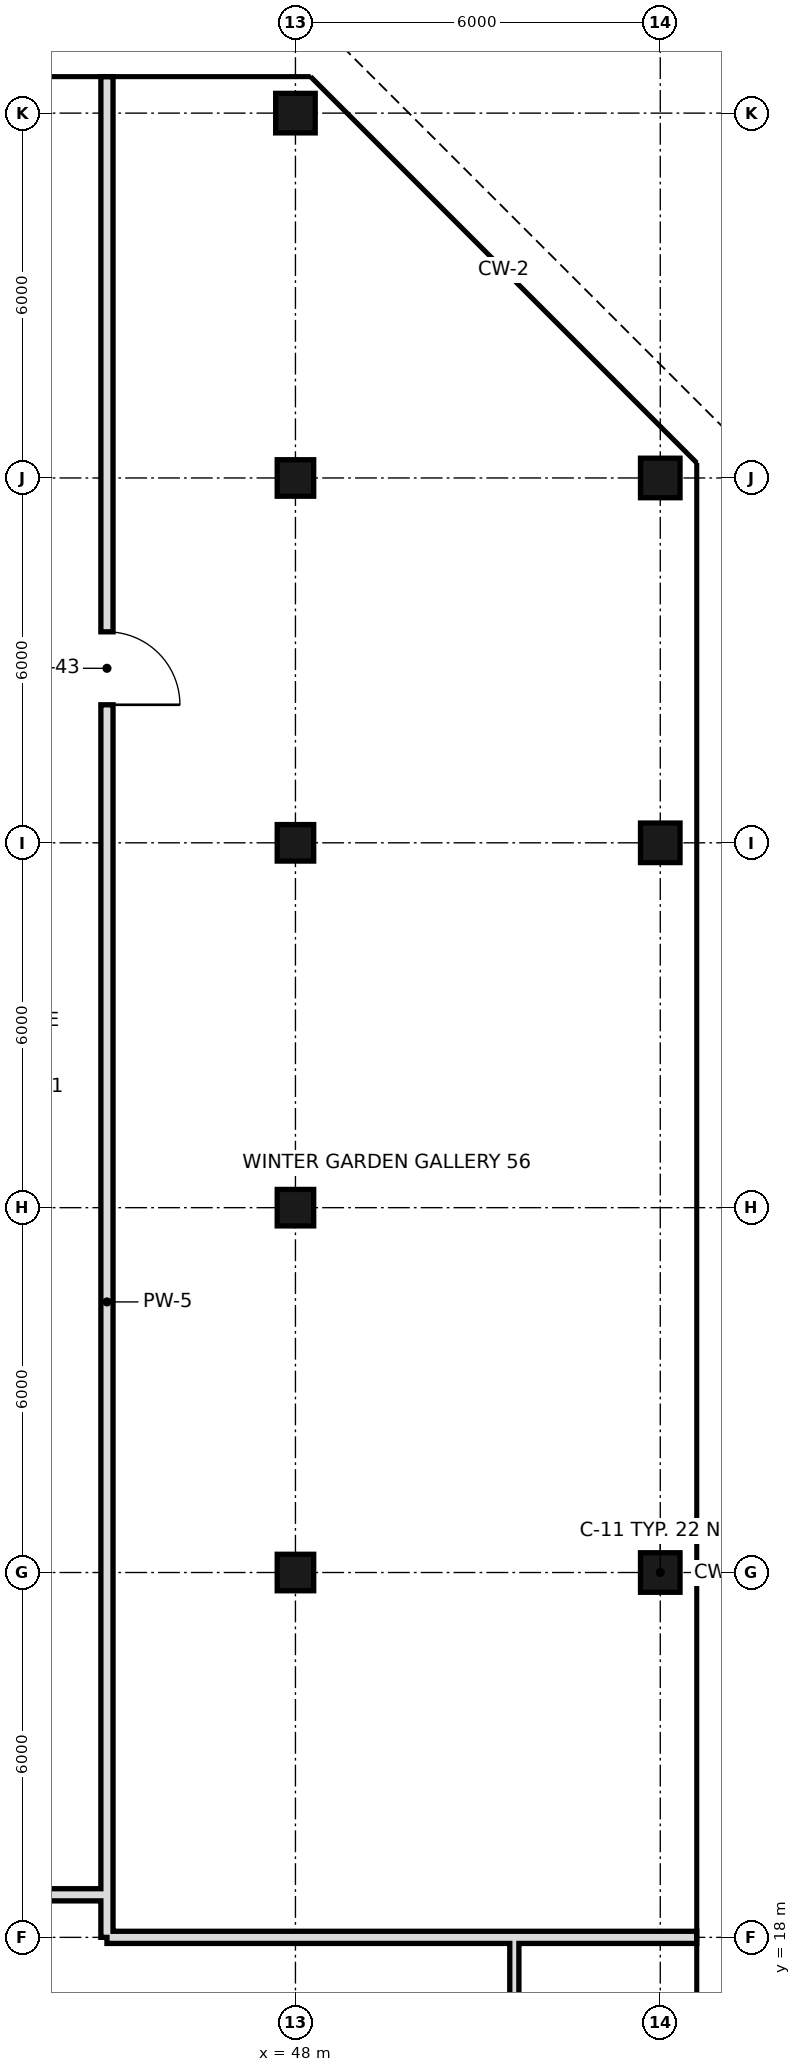
"""IFC4 building model, lengths in metres.
Left out: names, types, materials, properties, quantities, classifications, styles, units other than length and angle.
Written with IfcOpenShell. Run it as: python <this file> out.ifc"""

import sys

from ifc_helpers import new_model, si_unit, direction, frame, frame_2d, origin, origin_2d, place, context, subcontext, project, spatial, rectangle, hollow_rectangle, extrude, element, fill, save


model = new_model("IFC4")
c1 = context("Model", 3, precision=1e-05, world=origin(), true_north=direction((0.0, 1.0)))
c2 = subcontext(c1, "Body", "Model", "MODEL_VIEW")
j1 = project(units=[si_unit("LENGTHUNIT", "METRE"), si_unit("PLANEANGLEUNIT", "RADIAN")], contexts=[c1])
p1 = place(None, origin())
s1 = spatial("IfcSite", under=j1, at=p1, CompositionType="ELEMENT")
p2 = place(p1, origin())
s2 = spatial("IfcBuilding", under=s1, at=p2, CompositionType="ELEMENT")
p3 = place(p2, frame((0.0, 0.0, 239.6)))
s3 = spatial("IfcBuildingStorey", under=s2, at=p3, CompositionType="ELEMENT", Elevation=239.6)
for number, where, z_axis, x_axis in (
    (1, (48.0, 24.0, 0.0), (0.0, 0.0, 1.0), (1.0, 0.0, 0.0)),
    (2, (48.0, 30.0, 0.0), (0.0, 0.0, 1.0), (1.0, 0.0, 0.0)),
    (3, (48.0, 36.0, 0.0), (0.0, 0.0, 1.0), (1.0, 0.0, 0.0)),
    (4, (48.0, 42.0, 0.0), (0.0, 0.0, 1.0), (1.0, 0.0, 0.0)),
):
    element("IfcColumn", number, at=place(p3, frame(where, z_axis=z_axis, x_axis=x_axis)), inside=s3, PredefinedType="COLUMN", context=c2, shape_type="SweptSolid", body=[
        extrude(hollow_rectangle(XDim=0.6, YDim=0.6, WallThickness=0.028, at=origin_2d()), origin(), (0.0, 0.0, 1.0), 3.6),
    ])
for number, where, z_axis, x_axis in (
    (5, (48.0, 48.0, 0.0), (0.0, 0.0, 1.0), (1.0, 0.0, 0.0)),
    (6, (54.0, 24.0, 0.0), (0.0, 0.0, 1.0), (1.0, 0.0, 0.0)),
    (7, (54.0, 36.0, 0.0), (0.0, 0.0, 1.0), (1.0, 0.0, 0.0)),
    (8, (54.0, 42.0, 0.0), (0.0, 0.0, 1.0), (1.0, 0.0, 0.0)),
):
    element("IfcColumn", number, at=place(p3, frame(where, z_axis=z_axis, x_axis=x_axis)), inside=s3, PredefinedType="COLUMN", context=c2, shape_type="SweptSolid", body=[
        extrude(hollow_rectangle(XDim=0.65, YDim=0.65, WallThickness=0.032, at=origin_2d()), origin(), (0.0, 0.0, 1.0), 3.6),
    ])
p4 = place(p3, frame((44.9, 18.0, 0.0), z_axis=(0.0, 0.0, 1.0), x_axis=(0.0, 1.0, 0.0)))
e9 = element("IfcWall", 9, at=p4, inside=s3, PredefinedType="SOLIDWALL", context=c2, shape_type="SweptSolid", body=[
    extrude(rectangle(XDim=30.6, YDim=0.2, at=frame_2d((15.3, 0.0))), origin(), (0.0, 0.0, 1.0), 2.72),
])
p5 = place(p4, frame((20.27, 0.0, 0.0)))
e10 = element("IfcOpeningElement", 10, at=p5, cuts=e9, PredefinedType="OPENING", context=c2, shape_type="SweptSolid", body=[
    extrude(rectangle(XDim=1.2, YDim=2.4, at=frame_2d((0.6, 1.2))), frame((0.0, 0.11, 0.0), z_axis=(0.0, -1.0, 0.0), x_axis=(1.0, 0.0, 0.0)), (0.0, 0.0, 1.0), 0.22),
])
p6 = place(p3, frame((51.6, 10.8, 0.0), z_axis=(0.0, 0.0, 1.0), x_axis=(0.0, 1.0, 0.0)))
e11 = element("IfcWall", 11, at=p6, inside=s3, PredefinedType="PARTITIONING", context=c2, shape_type="SweptSolid", body=[
    extrude(rectangle(XDim=7.2, YDim=0.15, at=frame_2d((3.6, 0.0))), origin(), (0.0, 0.0, 1.0), 3.42),
])
p7 = place(p3, frame((44.9, 18.0, 0.0), z_axis=(0.0, 0.0, 1.0), x_axis=(1.0, 0.0, 0.0)))
e12 = element("IfcWall", 12, at=p7, inside=s3, PredefinedType="SOLIDWALL", context=c2, shape_type="SweptSolid", body=[
    extrude(rectangle(XDim=9.7, YDim=0.2, at=frame_2d((4.85, 0.0))), origin(), (0.0, 0.0, 1.0), 2.72),
])
p8 = place(p3, frame((40.8, 18.7, 0.0), z_axis=(0.0, 0.0, 1.0), x_axis=(1.0, 0.0, 0.0)))
e13 = element("IfcWall", 13, at=p8, inside=s3, PredefinedType="SOLIDWALL", context=c2, shape_type="SweptSolid", body=[
    extrude(rectangle(XDim=4.1, YDim=0.2, at=frame_2d((2.05, 0.0))), origin(), (0.0, 0.0, 1.0), 2.72),
])
p9 = place(p5, frame((1.2, 0.0, 0.0), z_axis=(0.0, 0.0, 1.0), x_axis=(-1.0, 0.0, 0.0)))
e14 = element("IfcDoor", 14, at=p9, inside=s3, OperationType="SINGLE_SWING_RIGHT", PredefinedType="DOOR", context=c2, shape_type="SweptSolid", body=[
    extrude(rectangle(XDim=1.2, YDim=2.4, at=frame_2d((0.6, 1.2))), frame((0.0, 0.025, 0.0), z_axis=(0.0, -1.0, 0.0), x_axis=(1.0, 0.0, 0.0)), (0.0, 0.0, 1.0), 0.05),
])
fill(e10, e14)
save(model, sys.argv[1])
